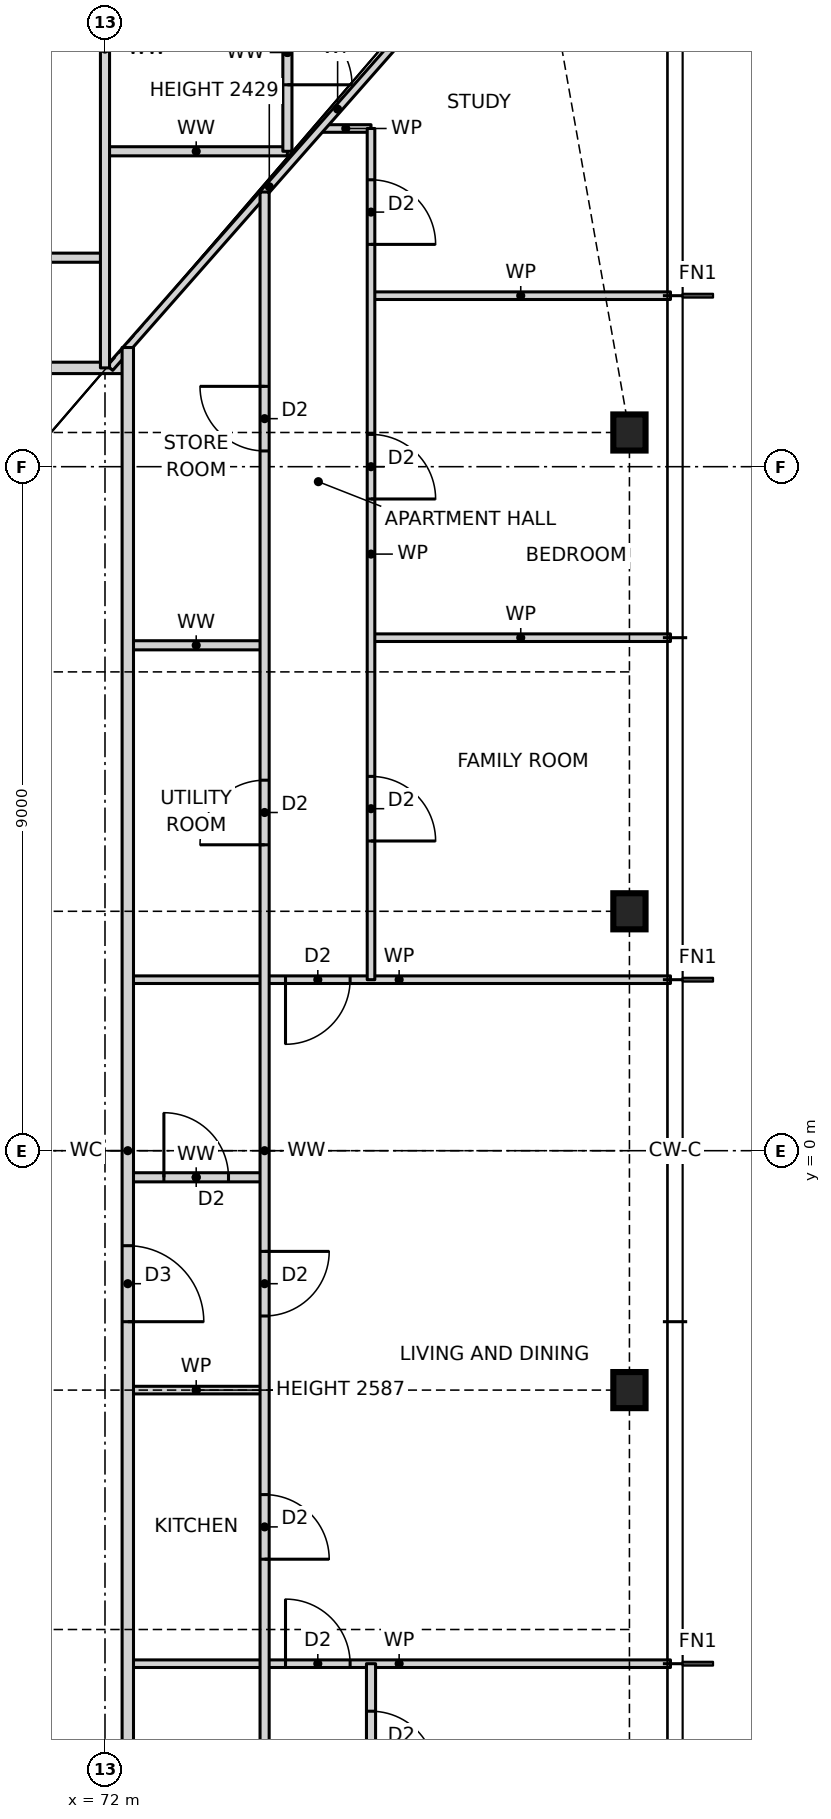
"""IFC4 building model, lengths in metres.
Left out: names, types, materials, properties, quantities, classifications, styles, units other than length and angle.
Written with IfcOpenShell. Run it as: python <this file> out.ifc"""

import sys

from ifc_helpers import new_model, si_unit, direction, frame, frame_2d, origin, origin_2d, place, context, subcontext, project, spatial, rectangle, i_section, extrude, element, fill, save


model = new_model("IFC4")
c1 = context("Model", 3, precision=1e-05, world=origin(), true_north=direction((0.0, 1.0)))
c2 = subcontext(c1, "Body", "Model", "MODEL_VIEW")
j1 = project(units=[si_unit("LENGTHUNIT", "METRE"), si_unit("PLANEANGLEUNIT", "RADIAN")], contexts=[c1])
p1 = place(None, origin())
s1 = spatial("IfcSite", under=j1, at=p1, CompositionType="ELEMENT")
p2 = place(p1, origin())
s2 = spatial("IfcBuilding", under=s1, at=p2, CompositionType="ELEMENT")
p3 = place(p2, frame((0.0, 0.0, 50.0)))
s3 = spatial("IfcBuildingStorey", under=s2, at=p3, CompositionType="ELEMENT", Elevation=50.0)
for number, where, z_axis, x_axis in (
    (1, (78.9, -3.15, 0.0), (0.0, 0.0, 1.0), (1.0, 0.0, 0.0)),
    (2, (78.9, 3.15, 0.0), (0.0, 0.0, 1.0), (1.0, 0.0, 0.0)),
    (3, (78.9, 9.45, 0.0), (0.0, 0.0, 1.0), (1.0, 0.0, 0.0)),
):
    element("IfcColumn", number, at=place(p3, frame(where, z_axis=z_axis, x_axis=x_axis)), inside=s3, PredefinedType="COLUMN", context=c2, shape_type="SweptSolid", body=[
        extrude(i_section(OverallWidth=0.424, OverallDepth=0.475, WebThickness=0.048, FlangeThickness=0.077, at=origin_2d()), origin(), (0.0, 0.0, 1.0), 3.5),
    ])
p4 = place(p3, frame((72.3, -6.75, 0.0), z_axis=(0.0, 0.0, 1.0), x_axis=(1.0, 0.0, 0.0)))
e4 = element("IfcWall", 4, at=p4, inside=s3, PredefinedType="PARTITIONING", context=c2, shape_type="SweptSolid", body=[
    extrude(rectangle(XDim=7.14, YDim=0.1, at=frame_2d((3.57, 0.0))), origin(), (0.0, 0.0, 1.0), 3.27),
])
p5 = place(p4, frame((2.075, 0.0, 0.0)))
e5 = element("IfcOpeningElement", 5, at=p5, cuts=e4, PredefinedType="OPENING", context=c2, shape_type="SweptSolid", body=[
    extrude(rectangle(XDim=0.85, YDim=2.1, at=frame_2d((0.425, 1.05))), frame((0.0, 0.06, 0.0), z_axis=(0.0, -1.0, 0.0), x_axis=(1.0, 0.0, 0.0)), (0.0, 0.0, 1.0), 0.12),
])
p6 = place(p3, frame((72.3, -3.15, 0.0), z_axis=(0.0, 0.0, 1.0), x_axis=(1.0, 0.0, 0.0)))
e6 = element("IfcWall", 6, at=p6, inside=s3, PredefinedType="PARTITIONING", context=c2, shape_type="SweptSolid", body=[
    extrude(rectangle(XDim=1.8, YDim=0.1, at=frame_2d((0.9, 0.0))), origin(), (0.0, 0.0, 1.0), 2.587),
])
p7 = place(p3, frame((72.3, -0.35, 0.0), z_axis=(0.0, 0.0, 1.0), x_axis=(1.0, 0.0, 0.0)))
e7 = element("IfcWall", 7, at=p7, inside=s3, PredefinedType="PARTITIONING", context=c2, shape_type="SweptSolid", body=[
    extrude(rectangle(XDim=1.8, YDim=0.12, at=frame_2d((0.9, 0.0))), origin(), (0.0, 0.0, 1.0), 3.27),
])
p8 = place(p7, frame((0.475, 0.0, 0.0)))
e8 = element("IfcOpeningElement", 8, at=p8, cuts=e7, PredefinedType="OPENING", context=c2, shape_type="SweptSolid", body=[
    extrude(rectangle(XDim=0.85, YDim=2.1, at=frame_2d((0.425, 1.05))), frame((0.0, 0.07, 0.0), z_axis=(0.0, -1.0, 0.0), x_axis=(1.0, 0.0, 0.0)), (0.0, 0.0, 1.0), 0.14),
])
p9 = place(p3, frame((72.3, 2.25, 0.0), z_axis=(0.0, 0.0, 1.0), x_axis=(1.0, 0.0, 0.0)))
e9 = element("IfcWall", 9, at=p9, inside=s3, PredefinedType="PARTITIONING", context=c2, shape_type="SweptSolid", body=[
    extrude(rectangle(XDim=7.14, YDim=0.1, at=frame_2d((3.57, 0.0))), origin(), (0.0, 0.0, 1.0), 3.27),
])
p10 = place(p9, frame((2.075, 0.0, 0.0)))
e10 = element("IfcOpeningElement", 10, at=p10, cuts=e9, PredefinedType="OPENING", context=c2, shape_type="SweptSolid", body=[
    extrude(rectangle(XDim=0.85, YDim=2.1, at=frame_2d((0.425, 1.05))), frame((0.0, 0.06, 0.0), z_axis=(0.0, -1.0, 0.0), x_axis=(1.0, 0.0, 0.0)), (0.0, 0.0, 1.0), 0.12),
])
p11 = place(p3, frame((72.3, 6.65, 0.0), z_axis=(0.0, 0.0, 1.0), x_axis=(1.0, 0.0, 0.0)))
e11 = element("IfcWall", 11, at=p11, inside=s3, PredefinedType="PARTITIONING", context=c2, shape_type="SweptSolid", body=[
    extrude(rectangle(XDim=1.8, YDim=0.12, at=frame_2d((0.9, 0.0))), origin(), (0.0, 0.0, 1.0), 3.27),
])
p12 = place(p3, frame((75.5, 6.75, 0.0), z_axis=(0.0, 0.0, 1.0), x_axis=(1.0, 0.0, 0.0)))
e12 = element("IfcWall", 12, at=p12, inside=s3, PredefinedType="PARTITIONING", context=c2, shape_type="SweptSolid", body=[
    extrude(rectangle(XDim=3.94, YDim=0.1, at=frame_2d((1.97, 0.0))), origin(), (0.0, 0.0, 1.0), 3.27),
])
p13 = place(p3, frame((53.7, 10.3, 0.0), z_axis=(0.0, 0.0, 1.0), x_axis=(1.0, 0.0, 0.0)))
e13 = element("IfcWall", 13, at=p13, inside=s3, PredefinedType="PARTITIONING", context=c2, shape_type="SweptSolid", body=[
    extrude(rectangle(XDim=18.6, YDim=0.15, at=frame_2d((9.3, 0.0))), origin(), (0.0, 0.0, 1.0), 3.27),
])
p14 = place(p13, frame((12.8, 0.0, 0.0)))
e14 = element("IfcOpeningElement", 14, at=p14, cuts=e13, PredefinedType="OPENING", context=c2, shape_type="SweptSolid", body=[
    extrude(rectangle(XDim=1.0, YDim=2.1, at=frame_2d((0.5, 1.05))), frame((0.0, 0.085, 0.0), z_axis=(0.0, -1.0, 0.0), x_axis=(1.0, 0.0, 0.0)), (0.0, 0.0, 1.0), 0.17),
])
p15 = place(p3, frame((75.5, 11.25, 0.0), z_axis=(0.0, 0.0, 1.0), x_axis=(1.0, 0.0, 0.0)))
e15 = element("IfcWall", 15, at=p15, inside=s3, PredefinedType="PARTITIONING", context=c2, shape_type="SweptSolid", body=[
    extrude(rectangle(XDim=3.94, YDim=0.1, at=frame_2d((1.97, 0.0))), origin(), (0.0, 0.0, 1.0), 3.27),
])
p16 = place(p3, frame((52.66, 11.75, 0.0), z_axis=(0.0, 0.0, 1.0), x_axis=(1.0, 0.0, 0.0)))
e16 = element("IfcWall", 16, at=p16, inside=s3, PredefinedType="PARTITIONING", context=c2, shape_type="SweptSolid", body=[
    extrude(rectangle(XDim=19.34, YDim=0.12, at=frame_2d((9.67, 0.0))), origin(), (0.0, 0.0, 1.0), 3.27),
])
p17 = place(p16, frame((17.115, 0.0, 0.0)))
e17 = element("IfcOpeningElement", 17, at=p17, cuts=e16, PredefinedType="OPENING", context=c2, shape_type="SweptSolid", body=[
    extrude(rectangle(XDim=0.85, YDim=2.1, at=frame_2d((0.425, 1.05))), frame((0.0, 0.07, 0.0), z_axis=(0.0, -1.0, 0.0), x_axis=(1.0, 0.0, 0.0)), (0.0, 0.0, 1.0), 0.14),
])
p18 = place(p16, frame((13.915, 0.0, 0.0)))
e18 = element("IfcOpeningElement", 18, at=p18, cuts=e16, PredefinedType="OPENING", context=c2, shape_type="SweptSolid", body=[
    extrude(rectangle(XDim=0.85, YDim=2.1, at=frame_2d((0.425, 1.05))), frame((0.0, 0.07, 0.0), z_axis=(0.0, -1.0, 0.0), x_axis=(1.0, 0.0, 0.0)), (0.0, 0.0, 1.0), 0.14),
])
p19 = place(p16, frame((7.165, 0.0, 0.0)))
e19 = element("IfcOpeningElement", 19, at=p19, cuts=e16, PredefinedType="OPENING", context=c2, shape_type="SweptSolid", body=[
    extrude(rectangle(XDim=0.85, YDim=2.1, at=frame_2d((0.425, 1.05))), frame((0.0, 0.07, 0.0), z_axis=(0.0, -1.0, 0.0), x_axis=(1.0, 0.0, 0.0)), (0.0, 0.0, 1.0), 0.14),
])
p20 = place(p16, frame((1.995, 0.0, 0.0)))
e20 = element("IfcOpeningElement", 20, at=p20, cuts=e16, PredefinedType="OPENING", context=c2, shape_type="SweptSolid", body=[
    extrude(rectangle(XDim=0.85, YDim=2.1, at=frame_2d((0.425, 1.05))), frame((0.0, 0.07, 0.0), z_axis=(0.0, -1.0, 0.0), x_axis=(1.0, 0.0, 0.0)), (0.0, 0.0, 1.0), 0.14),
])
p21 = place(p3, frame((72.0, 13.15, 0.0), z_axis=(0.0, 0.0, 1.0), x_axis=(1.0, 0.0, 0.0)))
e21 = element("IfcWall", 21, at=p21, inside=s3, PredefinedType="PARTITIONING", context=c2, shape_type="SweptSolid", body=[
    extrude(rectangle(XDim=2.4, YDim=0.12, at=frame_2d((1.2, 0.0))), origin(), (0.0, 0.0, 1.0), 3.27),
])
p22 = place(p3, frame((74.836, 13.45, 0.0), z_axis=(0.0, 0.0, 1.0), x_axis=(1.0, 0.0, 0.0)))
e22 = element("IfcWall", 22, at=p22, inside=s3, PredefinedType="PARTITIONING", context=c2, shape_type="SweptSolid", body=[
    extrude(rectangle(XDim=0.664, YDim=0.1, at=frame_2d((0.332, 0.0))), origin(), (0.0, 0.0, 1.0), 3.27),
])
p23 = place(p3, frame((72.064, 10.3, 0.0), z_axis=(0.0, 0.0, 1.0), x_axis=(0.660700699661, 0.750649442461, 0.0)))
e23 = element("IfcWall", 23, at=p23, inside=s3, PredefinedType="PARTITIONING", context=c2, shape_type="SweptSolid", body=[
    extrude(rectangle(XDim=9.071, YDim=0.1, at=frame_2d((4.535, 0.0))), origin(), (0.0, 0.0, 1.0), 2.429),
])
p24 = place(p3, frame((75.5, -13.45, 0.0), z_axis=(0.0, 0.0, 1.0), x_axis=(0.0, 1.0, 0.0)))
e24 = element("IfcWall", 24, at=p24, inside=s3, PredefinedType="PARTITIONING", context=c2, shape_type="SweptSolid", body=[
    extrude(rectangle(XDim=6.7, YDim=0.12, at=frame_2d((3.35, 0.0))), origin(), (0.0, 0.0, 1.0), 3.27),
])
p25 = place(p24, frame((5.225, 0.0, 0.0)))
e25 = element("IfcOpeningElement", 25, at=p25, cuts=e24, PredefinedType="OPENING", context=c2, shape_type="SweptSolid", body=[
    extrude(rectangle(XDim=0.85, YDim=2.1, at=frame_2d((0.425, 1.05))), frame((0.0, 0.07, 0.0), z_axis=(0.0, -1.0, 0.0), x_axis=(1.0, 0.0, 0.0)), (0.0, 0.0, 1.0), 0.14),
])
p26 = place(p24, frame((0.675, 0.0, 0.0)))
e26 = element("IfcOpeningElement", 26, at=p26, cuts=e24, PredefinedType="OPENING", context=c2, shape_type="SweptSolid", body=[
    extrude(rectangle(XDim=0.85, YDim=2.1, at=frame_2d((0.425, 1.05))), frame((0.0, 0.07, 0.0), z_axis=(0.0, -1.0, 0.0), x_axis=(1.0, 0.0, 0.0)), (0.0, 0.0, 1.0), 0.14),
])
p27 = place(p3, frame((75.5, 2.25, 0.0), z_axis=(0.0, 0.0, 1.0), x_axis=(0.0, 1.0, 0.0)))
e27 = element("IfcWall", 27, at=p27, inside=s3, PredefinedType="PARTITIONING", context=c2, shape_type="SweptSolid", body=[
    extrude(rectangle(XDim=11.2, YDim=0.1, at=frame_2d((5.6, 0.0))), origin(), (0.0, 0.0, 1.0), 3.27),
])
p28 = place(p27, frame((1.825, 0.0, 0.0)))
e28 = element("IfcOpeningElement", 28, at=p28, cuts=e27, PredefinedType="OPENING", context=c2, shape_type="SweptSolid", body=[
    extrude(rectangle(XDim=0.85, YDim=2.1, at=frame_2d((0.425, 1.05))), frame((0.0, 0.06, 0.0), z_axis=(0.0, -1.0, 0.0), x_axis=(1.0, 0.0, 0.0)), (0.0, 0.0, 1.0), 0.12),
])
p29 = place(p27, frame((6.325, 0.0, 0.0)))
e29 = element("IfcOpeningElement", 29, at=p29, cuts=e27, PredefinedType="OPENING", context=c2, shape_type="SweptSolid", body=[
    extrude(rectangle(XDim=0.85, YDim=2.1, at=frame_2d((0.425, 1.05))), frame((0.0, 0.06, 0.0), z_axis=(0.0, -1.0, 0.0), x_axis=(1.0, 0.0, 0.0)), (0.0, 0.0, 1.0), 0.12),
])
p30 = place(p27, frame((9.675, 0.0, 0.0)))
e30 = element("IfcOpeningElement", 30, at=p30, cuts=e27, PredefinedType="OPENING", context=c2, shape_type="SweptSolid", body=[
    extrude(rectangle(XDim=0.85, YDim=2.1, at=frame_2d((0.425, 1.05))), frame((0.0, 0.06, 0.0), z_axis=(0.0, -1.0, 0.0), x_axis=(1.0, 0.0, 0.0)), (0.0, 0.0, 1.0), 0.12),
])
p31 = place(p3, frame((74.4, 13.15, 0.0), z_axis=(0.0, 0.0, 1.0), x_axis=(0.0, 1.0, 0.0)))
e31 = element("IfcWall", 31, at=p31, inside=s3, PredefinedType="PARTITIONING", context=c2, shape_type="SweptSolid", body=[
    extrude(rectangle(XDim=2.6, YDim=0.12, at=frame_2d((1.3, 0.0))), origin(), (0.0, 0.0, 1.0), 3.27),
])
p32 = place(p31, frame((0.875, 0.0, 0.0)))
e32 = element("IfcOpeningElement", 32, at=p32, cuts=e31, PredefinedType="OPENING", context=c2, shape_type="SweptSolid", body=[
    extrude(rectangle(XDim=0.85, YDim=2.1, at=frame_2d((0.425, 1.05))), frame((0.0, 0.07, 0.0), z_axis=(0.0, -1.0, 0.0), x_axis=(1.0, 0.0, 0.0)), (0.0, 0.0, 1.0), 0.14),
])
p33 = place(p3, frame((74.1, -12.614, 0.0), z_axis=(0.0, 0.0, 1.0), x_axis=(0.0, 1.0, 0.0)))
e33 = element("IfcWall", 33, at=p33, inside=s3, PredefinedType="PARTITIONING", context=c2, shape_type="SweptSolid", body=[
    extrude(rectangle(XDim=25.228, YDim=0.12, at=frame_2d((12.614, 0.0))), origin(), (0.0, 0.0, 1.0), 3.27),
])
p34 = place(p33, frame((7.239, 0.0, 0.0)))
e34 = element("IfcOpeningElement", 34, at=p34, cuts=e33, PredefinedType="OPENING", context=c2, shape_type="SweptSolid", body=[
    extrude(rectangle(XDim=0.85, YDim=2.1, at=frame_2d((0.425, 1.05))), frame((0.0, 0.07, 0.0), z_axis=(0.0, -1.0, 0.0), x_axis=(1.0, 0.0, 0.0)), (0.0, 0.0, 1.0), 0.14),
])
p35 = place(p33, frame((10.439, 0.0, 0.0)))
e35 = element("IfcOpeningElement", 35, at=p35, cuts=e33, PredefinedType="OPENING", context=c2, shape_type="SweptSolid", body=[
    extrude(rectangle(XDim=0.85, YDim=2.1, at=frame_2d((0.425, 1.05))), frame((0.0, 0.07, 0.0), z_axis=(0.0, -1.0, 0.0), x_axis=(1.0, 0.0, 0.0)), (0.0, 0.0, 1.0), 0.14),
])
p36 = place(p33, frame((2.507, 0.0, 0.0)))
e36 = element("IfcOpeningElement", 36, at=p36, cuts=e33, PredefinedType="OPENING", context=c2, shape_type="SweptSolid", body=[
    extrude(rectangle(XDim=0.85, YDim=2.1, at=frame_2d((0.425, 1.05))), frame((0.0, 0.07, 0.0), z_axis=(0.0, -1.0, 0.0), x_axis=(1.0, 0.0, 0.0)), (0.0, 0.0, 1.0), 0.14),
])
p37 = place(p33, frame((16.639, 0.0, 0.0)))
e37 = element("IfcOpeningElement", 37, at=p37, cuts=e33, PredefinedType="OPENING", context=c2, shape_type="SweptSolid", body=[
    extrude(rectangle(XDim=0.85, YDim=2.1, at=frame_2d((0.425, 1.05))), frame((0.0, 0.07, 0.0), z_axis=(0.0, -1.0, 0.0), x_axis=(1.0, 0.0, 0.0)), (0.0, 0.0, 1.0), 0.14),
])
p38 = place(p33, frame((21.821, 0.0, 0.0)))
e38 = element("IfcOpeningElement", 38, at=p38, cuts=e33, PredefinedType="OPENING", context=c2, shape_type="SweptSolid", body=[
    extrude(rectangle(XDim=0.85, YDim=2.1, at=frame_2d((0.425, 1.05))), frame((0.0, 0.07, 0.0), z_axis=(0.0, -1.0, 0.0), x_axis=(1.0, 0.0, 0.0)), (0.0, 0.0, 1.0), 0.14),
])
p39 = place(p3, frame((72.3, -10.568, 0.0), z_axis=(0.0, 0.0, 1.0), x_axis=(0.0, 1.0, 0.0)))
e39 = element("IfcWall", 39, at=p39, inside=s3, PredefinedType="PARTITIONING", context=c2, shape_type="SweptSolid", body=[
    extrude(rectangle(XDim=21.136, YDim=0.15, at=frame_2d((10.568, 0.0))), origin(), (0.0, 0.0, 1.0), 3.27),
])
p40 = place(p39, frame((8.318, 0.0, 0.0)))
e40 = element("IfcOpeningElement", 40, at=p40, cuts=e39, PredefinedType="OPENING", context=c2, shape_type="SweptSolid", body=[
    extrude(rectangle(XDim=1.0, YDim=2.1, at=frame_2d((0.5, 1.05))), frame((0.0, 0.085, 0.0), z_axis=(0.0, -1.0, 0.0), x_axis=(1.0, 0.0, 0.0)), (0.0, 0.0, 1.0), 0.17),
])
p41 = place(p3, frame((72.0, 10.3, 0.0), z_axis=(0.0, 0.0, 1.0), x_axis=(0.0, 1.0, 0.0)))
e41 = element("IfcWall", 41, at=p41, inside=s3, PredefinedType="PARTITIONING", context=c2, shape_type="SweptSolid", body=[
    extrude(rectangle(XDim=8.39, YDim=0.12, at=frame_2d((4.195, 0.0))), origin(), (0.0, 0.0, 1.0), 3.27),
])
p42 = place(p41, frame((6.495, 0.0, 0.0)))
e42 = element("IfcOpeningElement", 42, at=p42, cuts=e41, PredefinedType="OPENING", context=c2, shape_type="SweptSolid", body=[
    extrude(rectangle(XDim=0.85, YDim=2.1, at=frame_2d((0.425, 1.05))), frame((0.0, 0.07, 0.0), z_axis=(0.0, -1.0, 0.0), x_axis=(1.0, 0.0, 0.0)), (0.0, 0.0, 1.0), 0.14),
])
p43 = place(p34, frame((0.85, 0.0, 0.0), z_axis=(0.0, 0.0, 1.0), x_axis=(-1.0, 0.0, 0.0)))
e43 = element("IfcDoor", 43, at=p43, inside=s3, OperationType="SINGLE_SWING_RIGHT", PredefinedType="DOOR", context=c2, shape_type="SweptSolid", body=[
    extrude(rectangle(XDim=0.85, YDim=2.1, at=frame_2d((0.425, 1.05))), frame((0.0, 0.025, 0.0), z_axis=(0.0, -1.0, 0.0), x_axis=(1.0, 0.0, 0.0)), (0.0, 0.0, 1.0), 0.05),
])
fill(e34, e43)
p44 = place(p40, frame((1.0, 0.0, 0.0), z_axis=(0.0, 0.0, 1.0), x_axis=(-1.0, 0.0, 0.0)))
e44 = element("IfcDoor", 44, at=p44, inside=s3, OperationType="SINGLE_SWING_RIGHT", PredefinedType="DOOR", context=c2, shape_type="SweptSolid", body=[
    extrude(rectangle(XDim=1.0, YDim=2.1, at=frame_2d((0.5, 1.05))), frame((0.0, 0.025, 0.0), z_axis=(0.0, -1.0, 0.0), x_axis=(1.0, 0.0, 0.0)), (0.0, 0.0, 1.0), 0.05),
])
fill(e40, e44)
p45 = place(p35, frame((0.85, 0.0, 0.0), z_axis=(0.0, 0.0, 1.0), x_axis=(-1.0, 0.0, 0.0)))
e45 = element("IfcDoor", 45, at=p45, inside=s3, OperationType="SINGLE_SWING_LEFT", PredefinedType="DOOR", context=c2, shape_type="SweptSolid", body=[
    extrude(rectangle(XDim=0.85, YDim=2.1, at=frame_2d((0.425, 1.05))), frame((0.0, 0.025, 0.0), z_axis=(0.0, -1.0, 0.0), x_axis=(1.0, 0.0, 0.0)), (0.0, 0.0, 1.0), 0.05),
])
fill(e35, e45)
p46 = place(p8, origin())
e46 = element("IfcDoor", 46, at=p46, inside=s3, OperationType="SINGLE_SWING_LEFT", PredefinedType="DOOR", context=c2, shape_type="SweptSolid", body=[
    extrude(rectangle(XDim=0.85, YDim=2.1, at=frame_2d((0.425, 1.05))), frame((0.0, 0.025, 0.0), z_axis=(0.0, -1.0, 0.0), x_axis=(1.0, 0.0, 0.0)), (0.0, 0.0, 1.0), 0.05),
])
fill(e8, e46)
p47 = place(p5, origin())
e47 = element("IfcDoor", 47, at=p47, inside=s3, OperationType="SINGLE_SWING_LEFT", PredefinedType="DOOR", context=c2, shape_type="SweptSolid", body=[
    extrude(rectangle(XDim=0.85, YDim=2.1, at=frame_2d((0.425, 1.05))), frame((0.0, 0.025, 0.0), z_axis=(0.0, -1.0, 0.0), x_axis=(1.0, 0.0, 0.0)), (0.0, 0.0, 1.0), 0.05),
])
fill(e5, e47)
p48 = place(p25, frame((0.85, 0.0, 0.0), z_axis=(0.0, 0.0, 1.0), x_axis=(-1.0, 0.0, 0.0)))
e48 = element("IfcDoor", 48, at=p48, inside=s3, OperationType="SINGLE_SWING_RIGHT", PredefinedType="DOOR", context=c2, shape_type="SweptSolid", body=[
    extrude(rectangle(XDim=0.85, YDim=2.1, at=frame_2d((0.425, 1.05))), frame((0.0, 0.025, 0.0), z_axis=(0.0, -1.0, 0.0), x_axis=(1.0, 0.0, 0.0)), (0.0, 0.0, 1.0), 0.05),
])
fill(e25, e48)
p49 = place(p10, frame((0.85, 0.0, 0.0), z_axis=(0.0, 0.0, 1.0), x_axis=(-1.0, 0.0, 0.0)))
e49 = element("IfcDoor", 49, at=p49, inside=s3, OperationType="SINGLE_SWING_RIGHT", PredefinedType="DOOR", context=c2, shape_type="SweptSolid", body=[
    extrude(rectangle(XDim=0.85, YDim=2.1, at=frame_2d((0.425, 1.05))), frame((0.0, 0.025, 0.0), z_axis=(0.0, -1.0, 0.0), x_axis=(1.0, 0.0, 0.0)), (0.0, 0.0, 1.0), 0.05),
])
fill(e10, e49)
p50 = place(p28, frame((0.85, 0.0, 0.0), z_axis=(0.0, 0.0, 1.0), x_axis=(-1.0, 0.0, 0.0)))
e50 = element("IfcDoor", 50, at=p50, inside=s3, OperationType="SINGLE_SWING_RIGHT", PredefinedType="DOOR", context=c2, shape_type="SweptSolid", body=[
    extrude(rectangle(XDim=0.85, YDim=2.1, at=frame_2d((0.425, 1.05))), frame((0.0, 0.025, 0.0), z_axis=(0.0, -1.0, 0.0), x_axis=(1.0, 0.0, 0.0)), (0.0, 0.0, 1.0), 0.05),
])
fill(e28, e50)
p51 = place(p29, frame((0.85, 0.0, 0.0), z_axis=(0.0, 0.0, 1.0), x_axis=(-1.0, 0.0, 0.0)))
e51 = element("IfcDoor", 51, at=p51, inside=s3, OperationType="SINGLE_SWING_RIGHT", PredefinedType="DOOR", context=c2, shape_type="SweptSolid", body=[
    extrude(rectangle(XDim=0.85, YDim=2.1, at=frame_2d((0.425, 1.05))), frame((0.0, 0.025, 0.0), z_axis=(0.0, -1.0, 0.0), x_axis=(1.0, 0.0, 0.0)), (0.0, 0.0, 1.0), 0.05),
])
fill(e29, e51)
p52 = place(p30, frame((0.85, 0.0, 0.0), z_axis=(0.0, 0.0, 1.0), x_axis=(-1.0, 0.0, 0.0)))
e52 = element("IfcDoor", 52, at=p52, inside=s3, OperationType="SINGLE_SWING_RIGHT", PredefinedType="DOOR", context=c2, shape_type="SweptSolid", body=[
    extrude(rectangle(XDim=0.85, YDim=2.1, at=frame_2d((0.425, 1.05))), frame((0.0, 0.025, 0.0), z_axis=(0.0, -1.0, 0.0), x_axis=(1.0, 0.0, 0.0)), (0.0, 0.0, 1.0), 0.05),
])
fill(e30, e52)
p53 = place(p37, origin())
e53 = element("IfcDoor", 53, at=p53, inside=s3, OperationType="SINGLE_SWING_LEFT", PredefinedType="DOOR", context=c2, shape_type="SweptSolid", body=[
    extrude(rectangle(XDim=0.85, YDim=2.1, at=frame_2d((0.425, 1.05))), frame((0.0, 0.025, 0.0), z_axis=(0.0, -1.0, 0.0), x_axis=(1.0, 0.0, 0.0)), (0.0, 0.0, 1.0), 0.05),
])
fill(e37, e53)
p54 = place(p38, origin())
e54 = element("IfcDoor", 54, at=p54, inside=s3, OperationType="SINGLE_SWING_RIGHT", PredefinedType="DOOR", context=c2, shape_type="SweptSolid", body=[
    extrude(rectangle(XDim=0.85, YDim=2.1, at=frame_2d((0.425, 1.05))), frame((0.0, 0.025, 0.0), z_axis=(0.0, -1.0, 0.0), x_axis=(1.0, 0.0, 0.0)), (0.0, 0.0, 1.0), 0.05),
])
fill(e38, e54)
p55 = place(p32, frame((0.85, 0.0, 0.0), z_axis=(0.0, 0.0, 1.0), x_axis=(-1.0, 0.0, 0.0)))
e55 = element("IfcDoor", 55, at=p55, inside=s3, OperationType="SINGLE_SWING_RIGHT", PredefinedType="DOOR", context=c2, shape_type="SweptSolid", body=[
    extrude(rectangle(XDim=0.85, YDim=2.1, at=frame_2d((0.425, 1.05))), frame((0.0, 0.025, 0.0), z_axis=(0.0, -1.0, 0.0), x_axis=(1.0, 0.0, 0.0)), (0.0, 0.0, 1.0), 0.05),
])
fill(e32, e55)
save(model, sys.argv[1])
